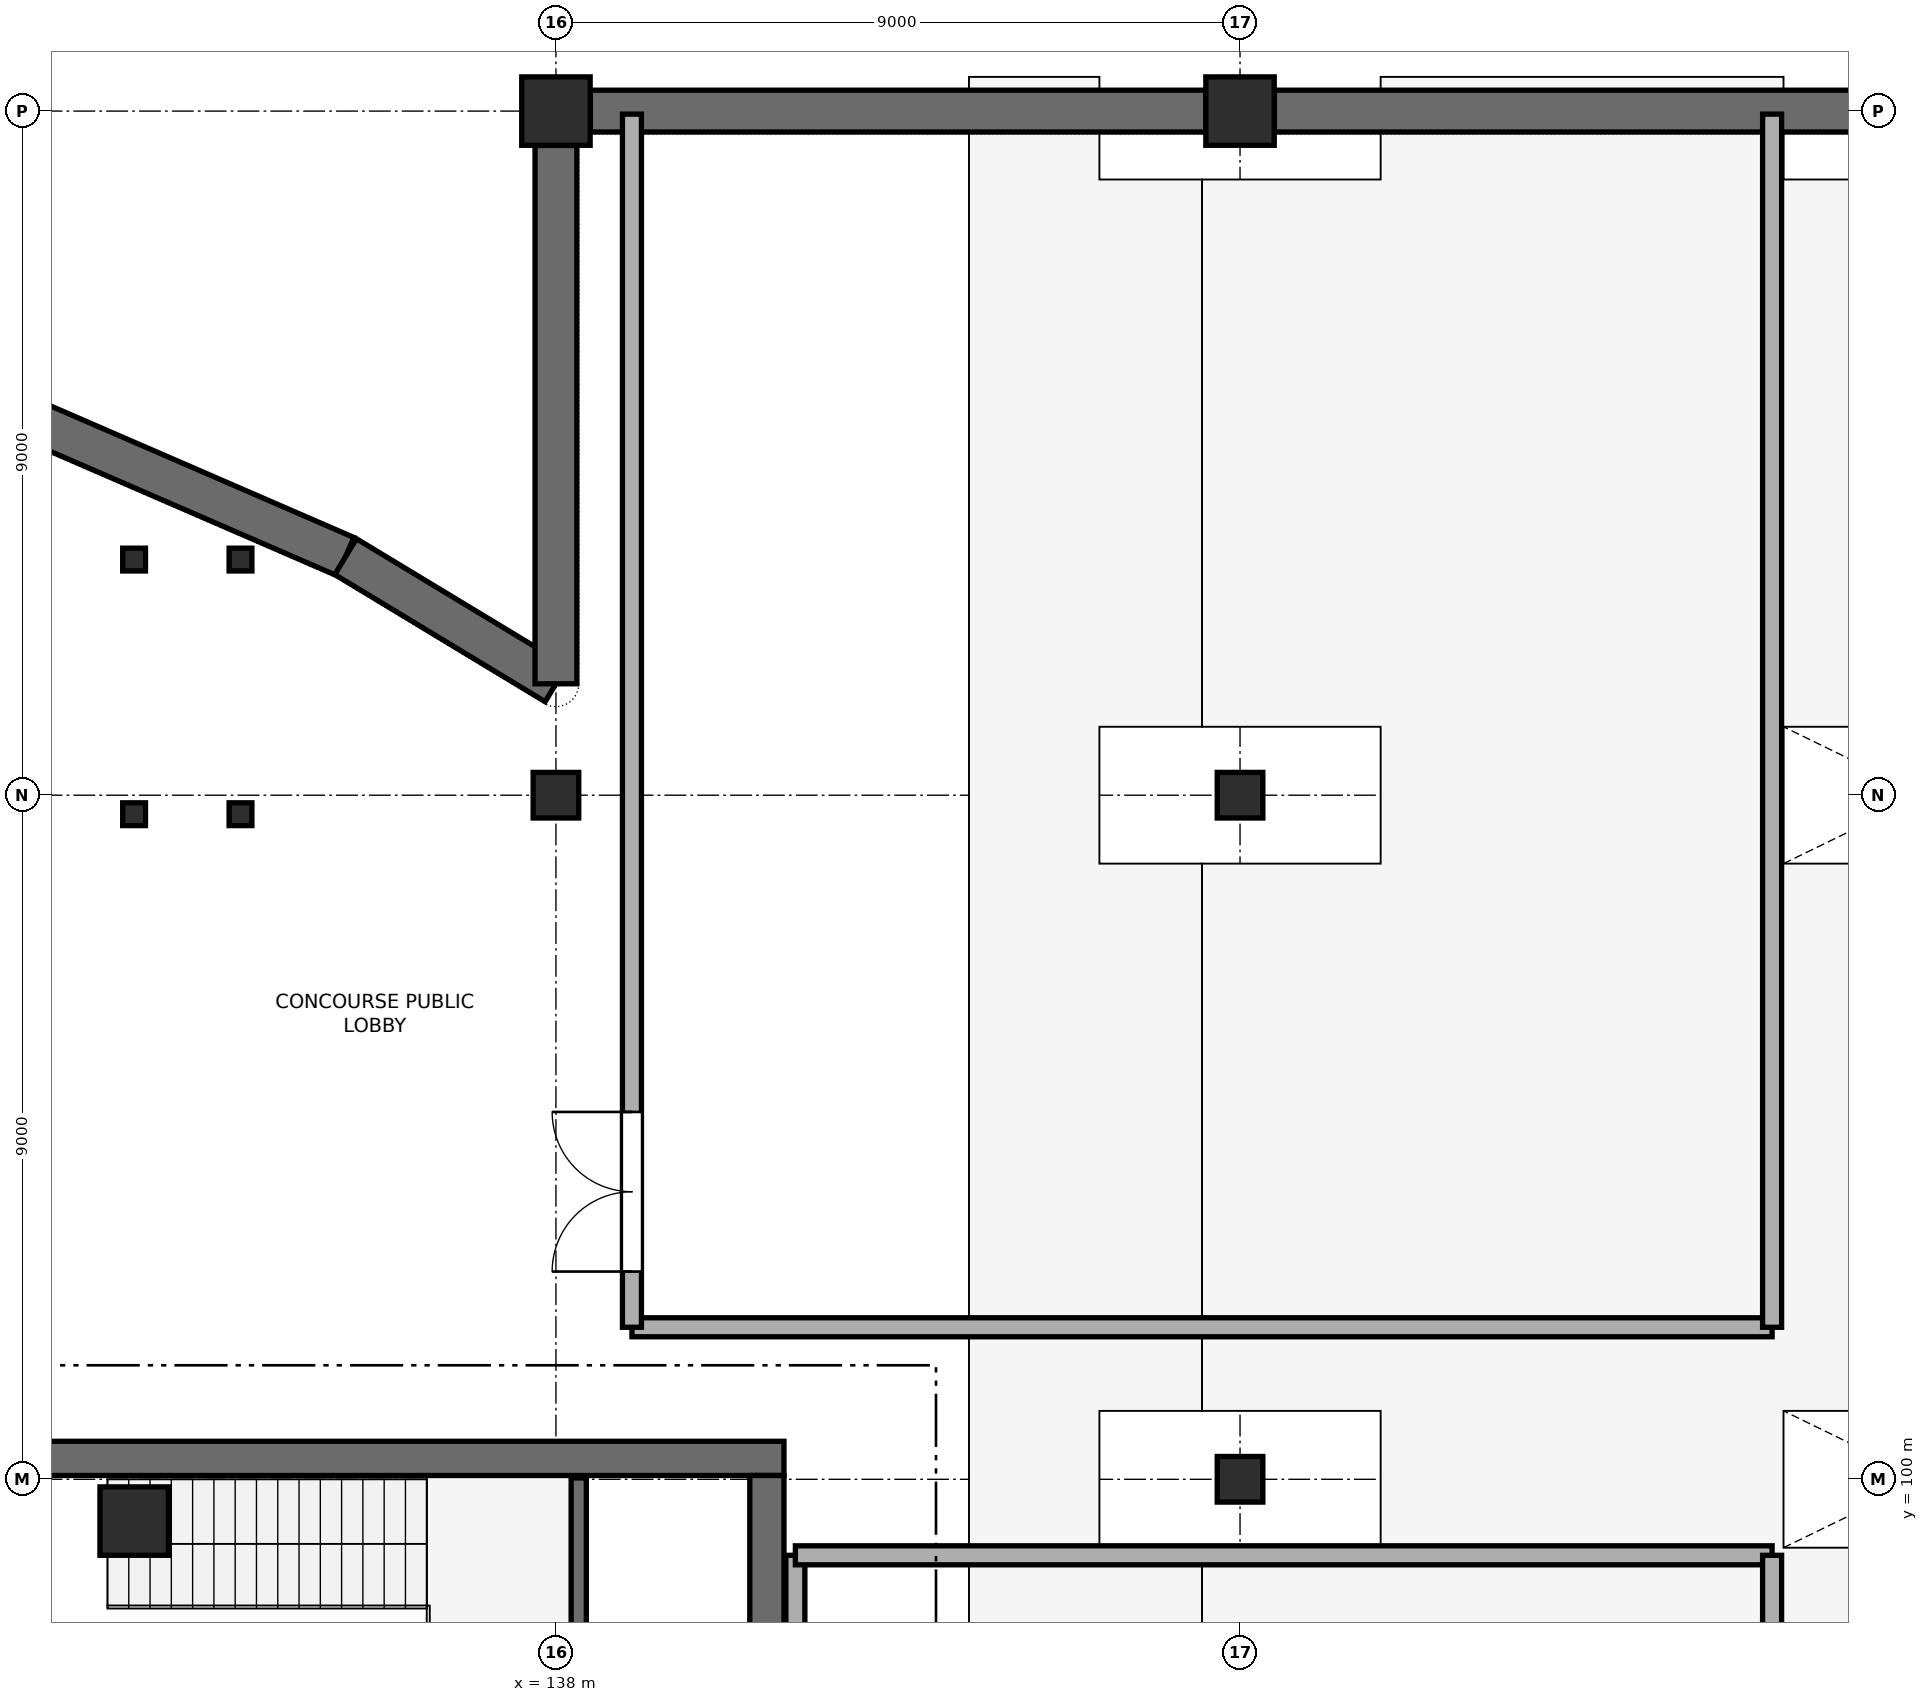
"""IFC4 building model, lengths in metres.
Left out: names, types, materials, properties, quantities, classifications, styles, units other than length and angle.
Written with IfcOpenShell. Run it as: python <this file> out.ifc"""

import sys

from ifc_helpers import new_model, si_unit, direction, frame, frame_2d, origin, origin_2d, place, context, subcontext, project, spatial, rectangle, hollow_rectangle, extrude, element, fill, save


model = new_model("IFC4")
c1 = context("Model", 3, precision=1e-05, world=origin(), true_north=direction((0.0, 1.0)))
c2 = subcontext(c1, "Body", "Model", "MODEL_VIEW")
j1 = project(units=[si_unit("LENGTHUNIT", "METRE"), si_unit("PLANEANGLEUNIT", "RADIAN")], contexts=[c1])
p1 = place(None, origin())
s1 = spatial("IfcSite", under=j1, at=p1, CompositionType="ELEMENT")
p2 = place(p1, origin())
s2 = spatial("IfcBuilding", under=s1, at=p2, CompositionType="ELEMENT")
p3 = place(p2, frame((0.0, 0.0, -5.4)))
s3 = spatial("IfcBuildingStorey", under=s2, at=p3, CompositionType="ELEMENT", Elevation=-5.4)
p4 = place(p3, frame((132.451, 99.45, 0.0), z_axis=(0.0, 0.0, 1.0), x_axis=(1.0, 0.0, 0.0)))
e1 = element("IfcColumn", 1, at=p4, inside=s3, PredefinedType="COLUMN", context=c2, shape_type="SweptSolid", body=[
    extrude(rectangle(XDim=0.9, YDim=0.9, at=origin_2d()), origin(), (0.0, 0.0, 1.0), 5.4),
])
p5 = place(p3, frame((138.0, 109.0, 0.0), z_axis=(0.0, 0.0, 1.0), x_axis=(1.0, 0.0, 0.0)))
e2 = element("IfcColumn", 2, at=p5, inside=s3, PredefinedType="COLUMN", context=c2, shape_type="SweptSolid", body=[
    extrude(rectangle(XDim=0.6, YDim=0.6, at=origin_2d()), origin(), (0.0, 0.0, 1.0), 5.4),
])
p6 = place(p3, frame((138.0, 118.0, 0.0), z_axis=(0.0, 0.0, 1.0), x_axis=(1.0, 0.0, 0.0)))
e3 = element("IfcColumn", 3, at=p6, inside=s3, PredefinedType="COLUMN", context=c2, shape_type="SweptSolid", body=[
    extrude(rectangle(XDim=0.9, YDim=0.9, at=origin_2d()), origin(), (0.0, 0.0, 1.0), 5.4),
])
for number, where, z_axis, x_axis in (
    (4, (147.0, 100.0, 0.0), (0.0, 0.0, 1.0), (1.0, 0.0, 0.0)),
    (5, (147.0, 109.0, 0.0), (0.0, 0.0, 1.0), (1.0, 0.0, 0.0)),
):
    element("IfcColumn", number, at=place(p3, frame(where, z_axis=z_axis, x_axis=x_axis)), inside=s3, PredefinedType="COLUMN", context=c2, shape_type="SweptSolid", body=[
        extrude(rectangle(XDim=0.6, YDim=0.6, at=origin_2d()), origin(), (0.0, 0.0, 1.0), 5.4),
    ])
p7 = place(p3, frame((147.0, 118.0, 0.0), z_axis=(0.0, 0.0, 1.0), x_axis=(1.0, 0.0, 0.0)))
e6 = element("IfcColumn", 6, at=p7, inside=s3, PredefinedType="COLUMN", context=c2, shape_type="SweptSolid", body=[
    extrude(rectangle(XDim=0.9, YDim=0.9, at=origin_2d()), origin(), (0.0, 0.0, 1.0), 5.4),
])
p8 = place(p3, frame((129.6, 100.275, 0.0), z_axis=(0.0, 0.0, 1.0), x_axis=(1.0, 0.0, 0.0)))
e7 = element("IfcWall", 7, at=p8, inside=s3, PredefinedType="SHEAR", context=c2, shape_type="SweptSolid", body=[
    extrude(rectangle(XDim=11.4, YDim=0.45, at=frame_2d((5.7, 0.0))), origin(), (0.0, 0.0, 1.0), 5.4),
])
p9 = place(p3, frame((140.775, 90.95, 0.0), z_axis=(0.0, 0.0, 1.0), x_axis=(0.0, 1.0, 0.0)))
e8 = element("IfcWall", 8, at=p9, inside=s3, PredefinedType="SHEAR", context=c2, shape_type="SweptSolid", body=[
    extrude(rectangle(XDim=9.1, YDim=0.45, at=frame_2d((4.55, 0.0))), origin(), (0.0, 0.0, 1.0), 5.4),
])
p10 = place(p3, frame((125.619, 116.308, 0.0), z_axis=(0.0, 0.0, 1.0), x_axis=(0.917436013805, -0.397883350461, 0.0)))
e9 = element("IfcWall", 9, at=p10, inside=s3, PredefinedType="SOLIDWALL", context=c2, shape_type="SweptSolid", body=[
    extrude(rectangle(XDim=10.479, YDim=0.55, at=frame_2d((5.239, 0.0))), origin(), (0.0, 0.0, 1.0), 5.04),
])
p11 = place(p3, frame((135.232, 112.138, 0.0), z_axis=(0.0, 0.0, 1.0), x_axis=(0.855809711202, -0.517290767569, 0.0)))
e10 = element("IfcWall", 10, at=p11, inside=s3, PredefinedType="SOLIDWALL", context=c2, shape_type="SweptSolid", body=[
    extrude(rectangle(XDim=3.234, YDim=0.55, at=frame_2d((1.617, 0.0))), origin(), (0.0, 0.0, 1.0), 5.04),
])
p12 = place(p3, frame((138.0, 110.466, 0.0), z_axis=(0.0, 0.0, 1.0), x_axis=(0.0, 1.0, 0.0)))
e11 = element("IfcWall", 11, at=p12, inside=s3, PredefinedType="SOLIDWALL", context=c2, shape_type="SweptSolid", body=[
    extrude(rectangle(XDim=7.083, YDim=0.55, at=frame_2d((3.541, 0.0))), origin(), (0.0, 0.0, 1.0), 5.04),
])
for number, where, z_axis, x_axis in (
    (12, (138.452, 118.0, 0.0), (0.0, 0.0, 1.0), (1.0, 0.0, 0.0)),
    (13, (147.452, 118.0, 0.0), (0.0, 0.0, 1.0), (1.0, 0.0, 0.0)),
):
    element("IfcWall", number, at=place(p3, frame(where, z_axis=z_axis, x_axis=x_axis)), inside=s3, PredefinedType="SOLIDWALL", context=c2, shape_type="SweptSolid", body=[
        extrude(rectangle(XDim=8.096, YDim=0.55, at=frame_2d((4.048, 0.0))), origin(), (0.0, 0.0, 1.0), 5.04),
    ])
p13 = place(p3, frame((138.3, 96.332, 0.0), z_axis=(0.0, 0.0, 1.0), x_axis=(0.0, 1.0, 0.0)))
e14 = element("IfcWall", 14, at=p13, inside=s3, PredefinedType="SHEAR", context=c2, shape_type="SweptSolid", body=[
    extrude(rectangle(XDim=3.686, YDim=0.2, at=frame_2d((1.843, 0.0))), origin(), (0.0, 0.0, 1.0), 5.4),
])
for number, where, z_axis, x_axis in (
    (15, (132.45, 108.75, 0.0), (0.0, 0.0, 1.0), (1.0, 0.0, 0.0)),
    (16, (132.45, 112.1, 0.0), (0.0, 0.0, 1.0), (1.0, 0.0, 0.0)),
    (17, (133.85, 108.75, 0.0), (0.0, 0.0, 1.0), (1.0, 0.0, 0.0)),
    (18, (133.85, 112.1, 0.0), (0.0, 0.0, 1.0), (1.0, 0.0, 0.0)),
):
    element("IfcColumn", number, at=place(p3, frame(where, z_axis=z_axis, x_axis=x_axis)), inside=s3, PredefinedType="COLUMN", context=c2, shape_type="SweptSolid", body=[
        extrude(hollow_rectangle(XDim=0.3, YDim=0.3, WallThickness=0.012, at=origin_2d()), origin(), (0.0, 0.0, 1.0), 5.4),
    ])
p14 = place(p3, frame((141.15, 90.35, 0.0), z_axis=(0.0, 0.0, 1.0), x_axis=(0.0, 1.0, 0.0)))
e19 = element("IfcWall", 19, at=p14, inside=s3, PredefinedType="STANDARD", context=c2, shape_type="SweptSolid", body=[
    extrude(rectangle(XDim=8.65, YDim=0.25, at=frame_2d((4.325, 0.0))), origin(), (0.0, 0.0, 1.0), 5.04),
])
p15 = place(p3, frame((141.15, 99.0, 0.0), z_axis=(0.0, 0.0, 1.0), x_axis=(1.0, 0.0, 0.0)))
e20 = element("IfcWall", 20, at=p15, inside=s3, PredefinedType="STANDARD", context=c2, shape_type="SweptSolid", body=[
    extrude(rectangle(XDim=12.85, YDim=0.25, at=frame_2d((6.425, 0.0))), origin(), (0.0, 0.0, 1.0), 5.04),
])
p16 = place(p3, frame((154.0, 99.0, 0.0), z_axis=(0.0, 0.0, 1.0), x_axis=(0.0, -1.0, 0.0)))
e21 = element("IfcWall", 21, at=p16, inside=s3, PredefinedType="STANDARD", context=c2, shape_type="SweptSolid", body=[
    extrude(rectangle(XDim=10.45, YDim=0.25, at=frame_2d((5.225, 0.0))), origin(), (0.0, 0.0, 1.0), 5.04),
])
p17 = place(p16, frame((2.332, 0.0, 0.0)))
e22 = element("IfcOpeningElement", 22, at=p17, cuts=e21, PredefinedType="OPENING", context=c2, shape_type="SweptSolid", body=[
    extrude(rectangle(XDim=2.1, YDim=2.4, at=frame_2d((1.05, 1.2))), frame((0.0, 0.135, 0.0), z_axis=(0.0, -1.0, 0.0), x_axis=(1.0, 0.0, 0.0)), (0.0, 0.0, 1.0), 0.27),
])
p18 = place(p3, frame((154.0, 102.0, 0.0), z_axis=(0.0, 0.0, 1.0), x_axis=(-1.0, 0.0, 0.0)))
e23 = element("IfcWall", 23, at=p18, inside=s3, PredefinedType="STANDARD", context=c2, shape_type="SweptSolid", body=[
    extrude(rectangle(XDim=15.0, YDim=0.25, at=frame_2d((7.5, 0.0))), origin(), (0.0, 0.0, 1.0), 5.04),
])
p19 = place(p3, frame((139.0, 102.0, 0.0), z_axis=(0.0, 0.0, 1.0), x_axis=(0.0, 1.0, 0.0)))
e24 = element("IfcWall", 24, at=p19, inside=s3, PredefinedType="STANDARD", context=c2, shape_type="SweptSolid", body=[
    extrude(rectangle(XDim=15.96, YDim=0.25, at=frame_2d((7.98, 0.0))), origin(), (0.0, 0.0, 1.0), 5.04),
])
p20 = place(p19, frame((0.733, 0.0, 0.0)))
e25 = element("IfcOpeningElement", 25, at=p20, cuts=e24, PredefinedType="OPENING", context=c2, shape_type="SweptSolid", body=[
    extrude(rectangle(XDim=2.1, YDim=2.4, at=frame_2d((1.05, 1.2))), frame((0.0, 0.135, 0.0), z_axis=(0.0, -1.0, 0.0), x_axis=(1.0, 0.0, 0.0)), (0.0, 0.0, 1.0), 0.27),
])
p21 = place(p3, frame((154.0, 117.96, 0.0), z_axis=(0.0, 0.0, 1.0), x_axis=(0.0, -1.0, 0.0)))
e26 = element("IfcWall", 26, at=p21, inside=s3, PredefinedType="STANDARD", context=c2, shape_type="SweptSolid", body=[
    extrude(rectangle(XDim=15.96, YDim=0.25, at=frame_2d((7.98, 0.0))), origin(), (0.0, 0.0, 1.0), 5.04),
])
p22 = place(p20, origin())
e27 = element("IfcDoor", 27, at=p22, inside=s3, OperationType="DOUBLE_DOOR_SINGLE_SWING", PredefinedType="DOOR", context=c2, shape_type="SweptSolid", body=[
    extrude(rectangle(XDim=2.1, YDim=2.4, at=frame_2d((1.05, 1.2))), frame((0.0, 0.025, 0.0), z_axis=(0.0, -1.0, 0.0), x_axis=(1.0, 0.0, 0.0)), (0.0, 0.0, 1.0), 0.05),
])
fill(e25, e27)
save(model, sys.argv[1])
